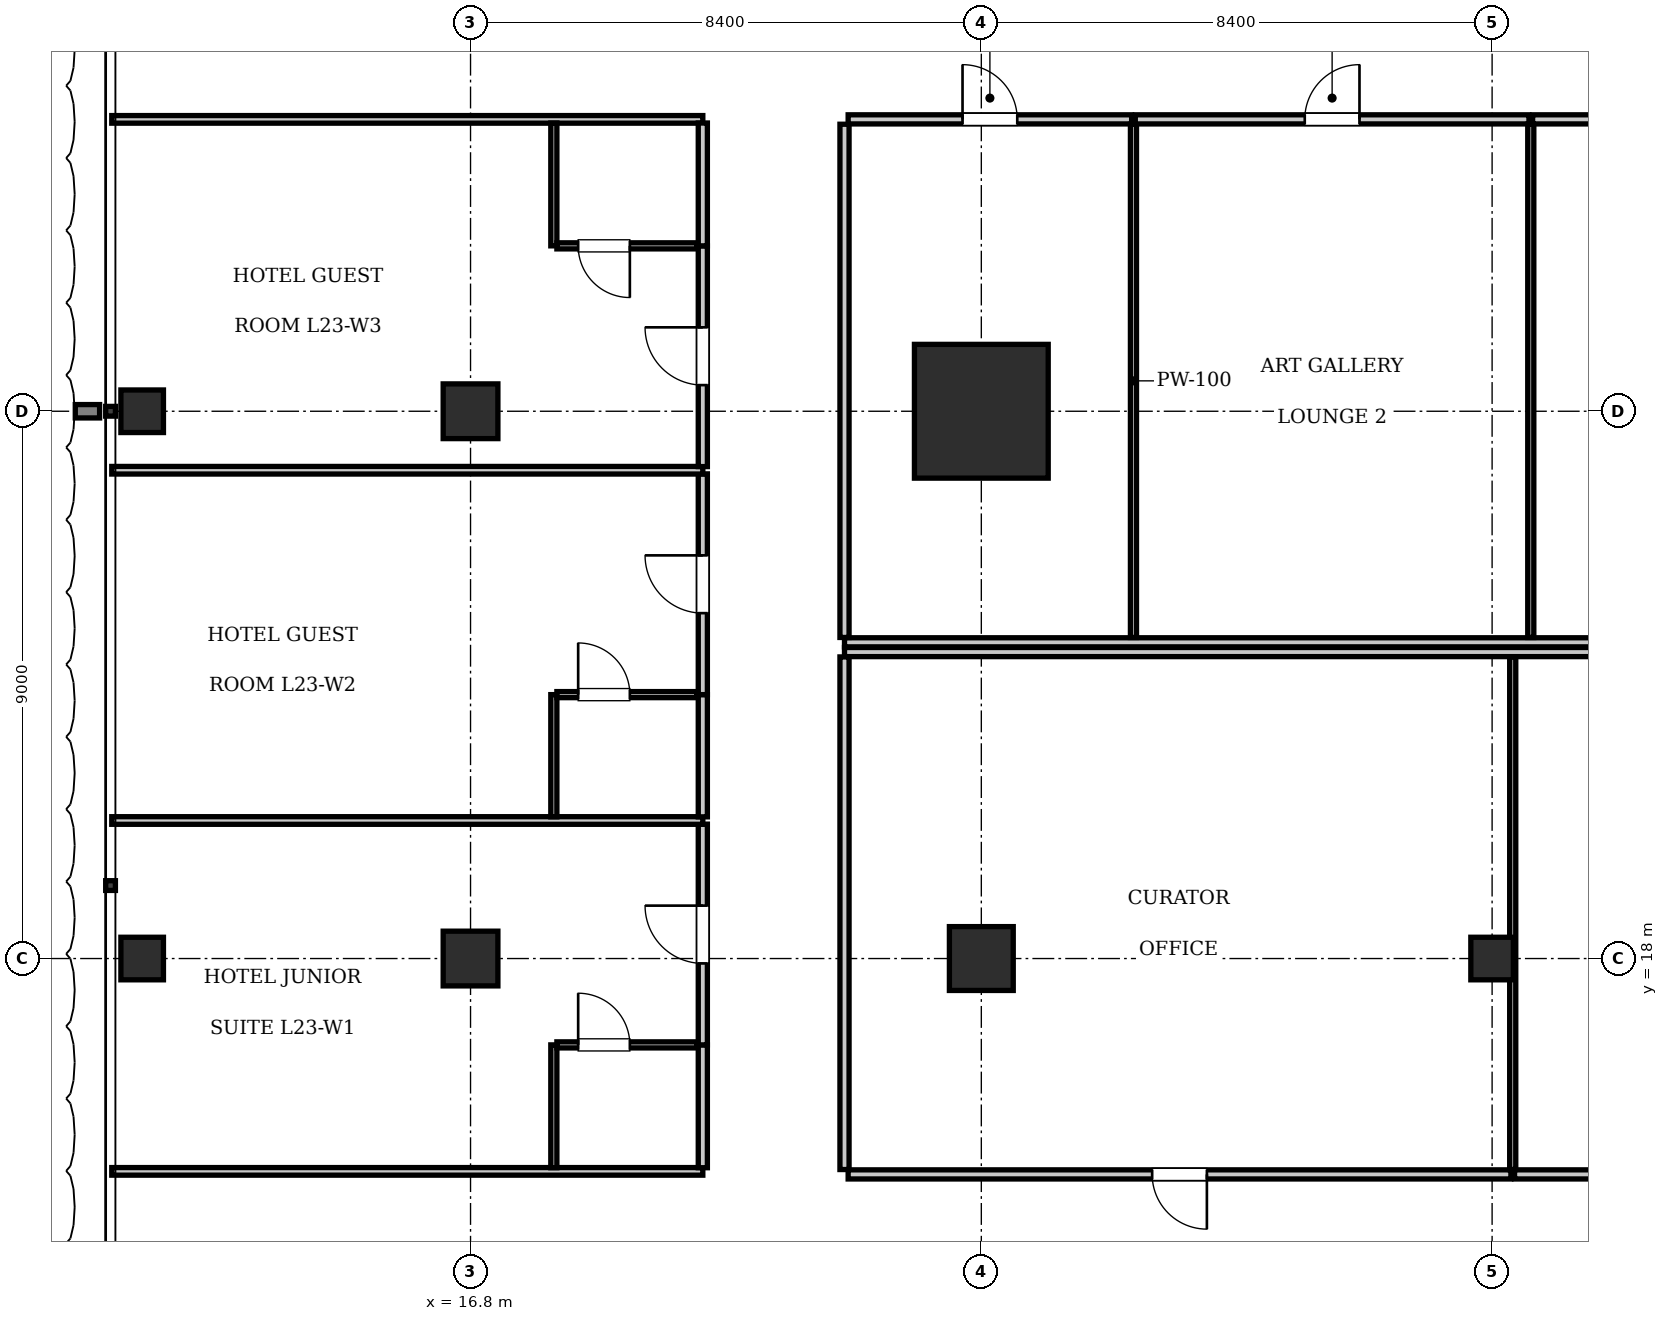
"""IFC4 building model, lengths in metres.
Left out: names, types, materials, properties, quantities, classifications, styles, units other than length and angle.
Written with IfcOpenShell. Run it as: python <this file> out.ifc"""

import sys

from ifc_helpers import new_model, si_unit, direction, frame, frame_2d, origin, origin_2d, place, context, subcontext, project, spatial, rectangle, i_section, extrude, element, fill, save


model = new_model("IFC4")
c1 = context("Model", 3, precision=1e-05, world=origin(), true_north=direction((0.0, 1.0)))
c2 = subcontext(c1, "Body", "Model", "MODEL_VIEW")
j1 = project(units=[si_unit("LENGTHUNIT", "METRE"), si_unit("PLANEANGLEUNIT", "RADIAN")], contexts=[c1])
p1 = place(None, origin())
s1 = spatial("IfcSite", under=j1, at=p1, CompositionType="ELEMENT")
p2 = place(p1, origin())
s2 = spatial("IfcBuilding", under=s1, at=p2, CompositionType="ELEMENT")
p3 = place(p2, frame((0.0, 0.0, 96.25)))
s3 = spatial("IfcBuildingStorey", under=s2, at=p3, CompositionType="ELEMENT", Elevation=96.25)
p4 = place(p3, frame((25.2, 27.0, 0.0), z_axis=(0.0, 0.0, 1.0), x_axis=(1.0, 0.0, 0.0)))
e1 = element("IfcColumn", 1, at=p4, inside=s3, PredefinedType="COLUMN", context=c2, shape_type="SweptSolid", body=[
    extrude(rectangle(XDim=2.2, YDim=2.2, at=origin_2d()), origin(), (0.0, 0.0, 1.0), 3.85),
])
p5 = place(p3, frame((25.2, 18.0, 0.0), z_axis=(0.0, 0.0, 1.0), x_axis=(1.0, 0.0, 0.0)))
e2 = element("IfcColumn", 2, at=p5, inside=s3, PredefinedType="COLUMN", context=c2, shape_type="SweptSolid", body=[
    extrude(rectangle(XDim=1.05, YDim=1.05, at=origin_2d()), origin(), (0.0, 0.0, 1.0), 3.85),
])
p6 = place(p3, frame((33.6, 18.0, 0.0), z_axis=(0.0, 0.0, 1.0), x_axis=(1.0, 0.0, 0.0)))
e3 = element("IfcColumn", 3, at=p6, inside=s3, PredefinedType="COLUMN", context=c2, shape_type="SweptSolid", body=[
    extrude(i_section(OverallWidth=0.7, OverallDepth=0.7, WebThickness=0.028, FlangeThickness=0.044, at=origin_2d()), origin(), (0.0, 0.0, 1.0), 3.85),
])
for number, where, z_axis, x_axis in (
    (4, (16.8, 18.0, 0.0), (0.0, 0.0, 1.0), (1.0, 0.0, 0.0)),
    (5, (16.8, 27.0, 0.0), (0.0, 0.0, 1.0), (1.0, 0.0, 0.0)),
):
    element("IfcColumn", number, at=place(p3, frame(where, z_axis=z_axis, x_axis=x_axis)), inside=s3, PredefinedType="COLUMN", context=c2, shape_type="SweptSolid", body=[
        extrude(rectangle(XDim=0.9, YDim=0.9, at=origin_2d()), origin(), (0.0, 0.0, 1.0), 3.85),
    ])
for number, where, z_axis, x_axis in (
    (6, (11.4, 18.0, 0.0), (0.0, 0.0, 1.0), (1.0, 0.0, 0.0)),
    (7, (11.4, 27.0, 0.0), (0.0, 0.0, 1.0), (1.0, 0.0, 0.0)),
):
    element("IfcColumn", number, at=place(p3, frame(where, z_axis=z_axis, x_axis=x_axis)), inside=s3, PredefinedType="COLUMN", context=c2, shape_type="SweptSolid", body=[
        extrude(i_section(OverallWidth=0.7, OverallDepth=0.7, WebThickness=0.028, FlangeThickness=0.044, at=origin_2d()), origin(), (0.0, 0.0, 1.0), 3.85),
    ])
p7 = place(p3, frame((22.95, 23.2, 0.0), z_axis=(0.0, 0.0, 1.0), x_axis=(1.0, 0.0, 0.0)))
e8 = element("IfcWall", 8, at=p7, inside=s3, PredefinedType="PARTITIONING", context=c2, shape_type="SweptSolid", body=[
    extrude(rectangle(XDim=29.7, YDim=0.15, at=frame_2d((14.85, 0.0))), origin(), (0.0, 0.0, 1.0), 3.61),
])
p8 = place(p3, frame((22.95, 23.28, 0.0), z_axis=(0.0, 0.0, 1.0), x_axis=(0.0, 1.0, 0.0)))
e9 = element("IfcWall", 9, at=p8, inside=s3, PredefinedType="PARTITIONING", context=c2, shape_type="SweptSolid", body=[
    extrude(rectangle(XDim=8.44, YDim=0.15, at=frame_2d((4.22, 0.0))), origin(), (0.0, 0.0, 1.0), 3.61),
])
p9 = place(p3, frame((23.01, 31.8, 0.0), z_axis=(0.0, 0.0, 1.0), x_axis=(1.0, 0.0, 0.0)))
e10 = element("IfcWall", 10, at=p9, inside=s3, PredefinedType="PARTITIONING", context=c2, shape_type="SweptSolid", body=[
    extrude(rectangle(XDim=4.662, YDim=0.15, at=frame_2d((2.331, 0.0))), origin(), (0.0, 0.0, 1.0), 3.61),
])
p10 = place(p9, frame((1.881, 0.0, 0.0)))
e11 = element("IfcOpeningElement", 11, at=p10, cuts=e10, PredefinedType="OPENING", context=c2, shape_type="SweptSolid", body=[
    extrude(rectangle(XDim=0.9, YDim=2.1, at=frame_2d((0.45, 1.05))), frame((0.0, 0.085, 0.0), z_axis=(0.0, -1.0, 0.0), x_axis=(1.0, 0.0, 0.0)), (0.0, 0.0, 1.0), 0.17),
])
p11 = place(p3, frame((27.702, 23.28, 0.0), z_axis=(0.0, 0.0, 1.0), x_axis=(0.0, 1.0, 0.0)))
e12 = element("IfcWall", 12, at=p11, inside=s3, PredefinedType="PARTITIONING", context=c2, shape_type="SweptSolid", body=[
    extrude(rectangle(XDim=8.44, YDim=0.1, at=frame_2d((4.22, 0.0))), origin(), (0.0, 0.0, 1.0), 3.61),
])
p12 = place(p3, frame((27.732, 31.8, 0.0), z_axis=(0.0, 0.0, 1.0), x_axis=(1.0, 0.0, 0.0)))
e13 = element("IfcWall", 13, at=p12, inside=s3, PredefinedType="PARTITIONING", context=c2, shape_type="SweptSolid", body=[
    extrude(rectangle(XDim=6.474, YDim=0.15, at=frame_2d((3.237, 0.0))), origin(), (0.0, 0.0, 1.0), 3.61),
])
p13 = place(p12, frame((2.787, 0.0, 0.0)))
e14 = element("IfcOpeningElement", 14, at=p13, cuts=e13, PredefinedType="OPENING", context=c2, shape_type="SweptSolid", body=[
    extrude(rectangle(XDim=0.9, YDim=2.1, at=frame_2d((0.45, 1.05))), frame((0.0, 0.085, 0.0), z_axis=(0.0, -1.0, 0.0), x_axis=(1.0, 0.0, 0.0)), (0.0, 0.0, 1.0), 0.17),
])
p14 = place(p3, frame((34.236, 23.28, 0.0), z_axis=(0.0, 0.0, 1.0), x_axis=(0.0, 1.0, 0.0)))
e15 = element("IfcWall", 15, at=p14, inside=s3, PredefinedType="PARTITIONING", context=c2, shape_type="SweptSolid", body=[
    extrude(rectangle(XDim=8.44, YDim=0.1, at=frame_2d((4.22, 0.0))), origin(), (0.0, 0.0, 1.0), 3.61),
])
p15 = place(p3, frame((34.266, 31.8, 0.0), z_axis=(0.0, 0.0, 1.0), x_axis=(1.0, 0.0, 0.0)))
e16 = element("IfcWall", 16, at=p15, inside=s3, PredefinedType="PARTITIONING", context=c2, shape_type="SweptSolid", body=[
    extrude(rectangle(XDim=8.256, YDim=0.15, at=frame_2d((4.128, 0.0))), origin(), (0.0, 0.0, 1.0), 3.61),
])
p16 = place(p15, frame((3.678, 0.0, 0.0)))
e17 = element("IfcOpeningElement", 17, at=p16, cuts=e16, PredefinedType="OPENING", context=c2, shape_type="SweptSolid", body=[
    extrude(rectangle(XDim=0.9, YDim=2.1, at=frame_2d((0.45, 1.05))), frame((0.0, 0.085, 0.0), z_axis=(0.0, -1.0, 0.0), x_axis=(1.0, 0.0, 0.0)), (0.0, 0.0, 1.0), 0.17),
])
p17 = place(p3, frame((22.95, 23.04, 0.0), z_axis=(0.0, 0.0, 1.0), x_axis=(1.0, 0.0, 0.0)))
e18 = element("IfcWall", 18, at=p17, inside=s3, PredefinedType="PARTITIONING", context=c2, shape_type="SweptSolid", body=[
    extrude(rectangle(XDim=29.7, YDim=0.15, at=frame_2d((14.85, 0.0))), origin(), (0.0, 0.0, 1.0), 3.61),
])
p18 = place(p3, frame((22.95, 14.53, 0.0), z_axis=(0.0, 0.0, 1.0), x_axis=(0.0, 1.0, 0.0)))
e19 = element("IfcWall", 19, at=p18, inside=s3, PredefinedType="PARTITIONING", context=c2, shape_type="SweptSolid", body=[
    extrude(rectangle(XDim=8.43, YDim=0.15, at=frame_2d((4.215, 0.0))), origin(), (0.0, 0.0, 1.0), 3.61),
])
p19 = place(p3, frame((23.01, 14.45, 0.0), z_axis=(0.0, 0.0, 1.0), x_axis=(1.0, 0.0, 0.0)))
e20 = element("IfcWall", 20, at=p19, inside=s3, PredefinedType="PARTITIONING", context=c2, shape_type="SweptSolid", body=[
    extrude(rectangle(XDim=10.899, YDim=0.15, at=frame_2d((5.449, 0.0))), origin(), (0.0, 0.0, 1.0), 3.61),
])
p20 = place(p19, frame((5.0, 0.0, 0.0)))
e21 = element("IfcOpeningElement", 21, at=p20, cuts=e20, PredefinedType="OPENING", context=c2, shape_type="SweptSolid", body=[
    extrude(rectangle(XDim=0.9, YDim=2.1, at=frame_2d((0.45, 1.05))), frame((0.0, 0.085, 0.0), z_axis=(0.0, -1.0, 0.0), x_axis=(1.0, 0.0, 0.0)), (0.0, 0.0, 1.0), 0.17),
])
p21 = place(p3, frame((33.939, 14.53, 0.0), z_axis=(0.0, 0.0, 1.0), x_axis=(0.0, 1.0, 0.0)))
e22 = element("IfcWall", 22, at=p21, inside=s3, PredefinedType="PARTITIONING", context=c2, shape_type="SweptSolid", body=[
    extrude(rectangle(XDim=8.43, YDim=0.1, at=frame_2d((4.215, 0.0))), origin(), (0.0, 0.0, 1.0), 3.61),
])
p22 = place(p3, frame((33.969, 14.45, 0.0), z_axis=(0.0, 0.0, 1.0), x_axis=(1.0, 0.0, 0.0)))
e23 = element("IfcWall", 23, at=p22, inside=s3, PredefinedType="PARTITIONING", context=c2, shape_type="SweptSolid", body=[
    extrude(rectangle(XDim=18.621, YDim=0.15, at=frame_2d((9.311, 0.0))), origin(), (0.0, 0.0, 1.0), 3.61),
])
p23 = place(p22, frame((8.861, 0.0, 0.0)))
e24 = element("IfcOpeningElement", 24, at=p23, cuts=e23, PredefinedType="OPENING", context=c2, shape_type="SweptSolid", body=[
    extrude(rectangle(XDim=0.9, YDim=2.1, at=frame_2d((0.45, 1.05))), frame((0.0, 0.085, 0.0), z_axis=(0.0, -1.0, 0.0), x_axis=(1.0, 0.0, 0.0)), (0.0, 0.0, 1.0), 0.17),
])
for number, where, z_axis, x_axis in (
    (25, (10.9, 14.5, 0.0), (0.0, 0.0, 1.0), (1.0, 0.0, 0.0)),
    (26, (10.9, 31.8, 0.0), (0.0, 0.0, 1.0), (1.0, 0.0, 0.0)),
):
    element("IfcWall", number, at=place(p3, frame(where, z_axis=z_axis, x_axis=x_axis)), inside=s3, PredefinedType="PARTITIONING", context=c2, shape_type="SweptSolid", body=[
        extrude(rectangle(XDim=9.72, YDim=0.125, at=frame_2d((4.86, 0.0))), origin(), (0.0, 0.0, 1.0), 3.61),
    ])
p24 = place(p3, frame((20.62, 14.56, 0.0), z_axis=(0.0, 0.0, 1.0), x_axis=(0.0, 1.0, 0.0)))
e27 = element("IfcWall", 27, at=p24, inside=s3, PredefinedType="PARTITIONING", context=c2, shape_type="SweptSolid", body=[
    extrude(rectangle(XDim=2.02, YDim=0.15, at=frame_2d((1.01, 0.0))), origin(), (0.0, 0.0, 1.0), 3.61),
])
p25 = place(p3, frame((20.62, 16.58, 0.0), z_axis=(0.0, 0.0, 1.0), x_axis=(0.0, 1.0, 0.0)))
e28 = element("IfcWall", 28, at=p25, inside=s3, PredefinedType="PARTITIONING", context=c2, shape_type="SweptSolid", body=[
    extrude(rectangle(XDim=3.63, YDim=0.15, at=frame_2d((1.815, 0.0))), origin(), (0.0, 0.0, 1.0), 3.61),
])
p26 = place(p25, frame((1.34, 0.0, 0.0)))
e29 = element("IfcOpeningElement", 29, at=p26, cuts=e28, PredefinedType="OPENING", context=c2, shape_type="SweptSolid", body=[
    extrude(rectangle(XDim=0.95, YDim=2.15, at=frame_2d((0.475, 1.075))), frame((0.0, 0.085, 0.0), z_axis=(0.0, -1.0, 0.0), x_axis=(1.0, 0.0, 0.0)), (0.0, 0.0, 1.0), 0.17),
])
p27 = place(p3, frame((18.17, 14.56, 0.0), z_axis=(0.0, 0.0, 1.0), x_axis=(0.0, 1.0, 0.0)))
e30 = element("IfcWall", 30, at=p27, inside=s3, PredefinedType="PARTITIONING", context=c2, shape_type="SweptSolid", body=[
    extrude(rectangle(XDim=2.02, YDim=0.1, at=frame_2d((1.01, 0.0))), origin(), (0.0, 0.0, 1.0), 3.61),
])
p28 = place(p3, frame((18.22, 16.58, 0.0), z_axis=(0.0, 0.0, 1.0), x_axis=(1.0, 0.0, 0.0)))
e31 = element("IfcWall", 31, at=p28, inside=s3, PredefinedType="PARTITIONING", context=c2, shape_type="SweptSolid", body=[
    extrude(rectangle(XDim=2.3, YDim=0.1, at=frame_2d((1.15, 0.0))), origin(), (0.0, 0.0, 1.0), 3.61),
])
p29 = place(p28, frame((0.35, 0.0, 0.0)))
e32 = element("IfcOpeningElement", 32, at=p29, cuts=e31, PredefinedType="OPENING", context=c2, shape_type="SweptSolid", body=[
    extrude(rectangle(XDim=0.85, YDim=2.1, at=frame_2d((0.425, 1.05))), frame((0.0, 0.06, 0.0), z_axis=(0.0, -1.0, 0.0), x_axis=(1.0, 0.0, 0.0)), (0.0, 0.0, 1.0), 0.12),
])
p30 = place(p3, frame((10.9, 20.27, 0.0), z_axis=(0.0, 0.0, 1.0), x_axis=(1.0, 0.0, 0.0)))
e33 = element("IfcWall", 33, at=p30, inside=s3, PredefinedType="PARTITIONING", context=c2, shape_type="SweptSolid", body=[
    extrude(rectangle(XDim=9.72, YDim=0.125, at=frame_2d((4.86, 0.0))), origin(), (0.0, 0.0, 1.0), 3.61),
])
p31 = place(p3, frame((20.62, 20.33, 0.0), z_axis=(0.0, 0.0, 1.0), x_axis=(0.0, 1.0, 0.0)))
e34 = element("IfcWall", 34, at=p31, inside=s3, PredefinedType="PARTITIONING", context=c2, shape_type="SweptSolid", body=[
    extrude(rectangle(XDim=2.01, YDim=0.15, at=frame_2d((1.005, 0.0))), origin(), (0.0, 0.0, 1.0), 3.61),
])
p32 = place(p3, frame((20.62, 22.34, 0.0), z_axis=(0.0, 0.0, 1.0), x_axis=(0.0, 1.0, 0.0)))
e35 = element("IfcWall", 35, at=p32, inside=s3, PredefinedType="PARTITIONING", context=c2, shape_type="SweptSolid", body=[
    extrude(rectangle(XDim=3.63, YDim=0.15, at=frame_2d((1.815, 0.0))), origin(), (0.0, 0.0, 1.0), 3.61),
])
p33 = place(p32, frame((1.34, 0.0, 0.0)))
e36 = element("IfcOpeningElement", 36, at=p33, cuts=e35, PredefinedType="OPENING", context=c2, shape_type="SweptSolid", body=[
    extrude(rectangle(XDim=0.95, YDim=2.15, at=frame_2d((0.475, 1.075))), frame((0.0, 0.085, 0.0), z_axis=(0.0, -1.0, 0.0), x_axis=(1.0, 0.0, 0.0)), (0.0, 0.0, 1.0), 0.17),
])
p34 = place(p3, frame((18.17, 20.33, 0.0), z_axis=(0.0, 0.0, 1.0), x_axis=(0.0, 1.0, 0.0)))
e37 = element("IfcWall", 37, at=p34, inside=s3, PredefinedType="PARTITIONING", context=c2, shape_type="SweptSolid", body=[
    extrude(rectangle(XDim=2.01, YDim=0.1, at=frame_2d((1.005, 0.0))), origin(), (0.0, 0.0, 1.0), 3.61),
])
p35 = place(p3, frame((18.22, 22.34, 0.0), z_axis=(0.0, 0.0, 1.0), x_axis=(1.0, 0.0, 0.0)))
e38 = element("IfcWall", 38, at=p35, inside=s3, PredefinedType="PARTITIONING", context=c2, shape_type="SweptSolid", body=[
    extrude(rectangle(XDim=2.3, YDim=0.1, at=frame_2d((1.15, 0.0))), origin(), (0.0, 0.0, 1.0), 3.61),
])
p36 = place(p35, frame((0.35, 0.0, 0.0)))
e39 = element("IfcOpeningElement", 39, at=p36, cuts=e38, PredefinedType="OPENING", context=c2, shape_type="SweptSolid", body=[
    extrude(rectangle(XDim=0.85, YDim=2.1, at=frame_2d((0.425, 1.05))), frame((0.0, 0.06, 0.0), z_axis=(0.0, -1.0, 0.0), x_axis=(1.0, 0.0, 0.0)), (0.0, 0.0, 1.0), 0.12),
])
p37 = place(p3, frame((10.9, 26.03, 0.0), z_axis=(0.0, 0.0, 1.0), x_axis=(1.0, 0.0, 0.0)))
e40 = element("IfcWall", 40, at=p37, inside=s3, PredefinedType="PARTITIONING", context=c2, shape_type="SweptSolid", body=[
    extrude(rectangle(XDim=9.72, YDim=0.125, at=frame_2d((4.86, 0.0))), origin(), (0.0, 0.0, 1.0), 3.61),
])
p38 = place(p3, frame((20.62, 26.09, 0.0), z_axis=(0.0, 0.0, 1.0), x_axis=(0.0, 1.0, 0.0)))
e41 = element("IfcWall", 41, at=p38, inside=s3, PredefinedType="PARTITIONING", context=c2, shape_type="SweptSolid", body=[
    extrude(rectangle(XDim=3.63, YDim=0.15, at=frame_2d((1.815, 0.0))), origin(), (0.0, 0.0, 1.0), 3.61),
])
p39 = place(p38, frame((1.34, 0.0, 0.0)))
e42 = element("IfcOpeningElement", 42, at=p39, cuts=e41, PredefinedType="OPENING", context=c2, shape_type="SweptSolid", body=[
    extrude(rectangle(XDim=0.95, YDim=2.15, at=frame_2d((0.475, 1.075))), frame((0.0, 0.085, 0.0), z_axis=(0.0, -1.0, 0.0), x_axis=(1.0, 0.0, 0.0)), (0.0, 0.0, 1.0), 0.17),
])
p40 = place(p3, frame((20.62, 29.72, 0.0), z_axis=(0.0, 0.0, 1.0), x_axis=(0.0, 1.0, 0.0)))
e43 = element("IfcWall", 43, at=p40, inside=s3, PredefinedType="PARTITIONING", context=c2, shape_type="SweptSolid", body=[
    extrude(rectangle(XDim=2.02, YDim=0.15, at=frame_2d((1.01, 0.0))), origin(), (0.0, 0.0, 1.0), 3.61),
])
p41 = place(p3, frame((18.17, 29.72, 0.0), z_axis=(0.0, 0.0, 1.0), x_axis=(0.0, 1.0, 0.0)))
e44 = element("IfcWall", 44, at=p41, inside=s3, PredefinedType="PARTITIONING", context=c2, shape_type="SweptSolid", body=[
    extrude(rectangle(XDim=2.02, YDim=0.1, at=frame_2d((1.01, 0.0))), origin(), (0.0, 0.0, 1.0), 3.61),
])
p42 = place(p3, frame((18.22, 29.72, 0.0), z_axis=(0.0, 0.0, 1.0), x_axis=(1.0, 0.0, 0.0)))
e45 = element("IfcWall", 45, at=p42, inside=s3, PredefinedType="PARTITIONING", context=c2, shape_type="SweptSolid", body=[
    extrude(rectangle(XDim=2.3, YDim=0.1, at=frame_2d((1.15, 0.0))), origin(), (0.0, 0.0, 1.0), 3.61),
])
p43 = place(p42, frame((0.35, 0.0, 0.0)))
e46 = element("IfcOpeningElement", 46, at=p43, cuts=e45, PredefinedType="OPENING", context=c2, shape_type="SweptSolid", body=[
    extrude(rectangle(XDim=0.85, YDim=2.1, at=frame_2d((0.425, 1.05))), frame((0.0, 0.06, 0.0), z_axis=(0.0, -1.0, 0.0), x_axis=(1.0, 0.0, 0.0)), (0.0, 0.0, 1.0), 0.12),
])
p44 = place(p10, origin())
e47 = element("IfcDoor", 47, at=p44, inside=s3, OperationType="SINGLE_SWING_LEFT", PredefinedType="DOOR", context=c2, shape_type="SweptSolid", body=[
    extrude(rectangle(XDim=0.9, YDim=2.1, at=frame_2d((0.45, 1.05))), frame((0.0, 0.025, 0.0), z_axis=(0.0, -1.0, 0.0), x_axis=(1.0, 0.0, 0.0)), (0.0, 0.0, 1.0), 0.05),
])
fill(e11, e47)
p45 = place(p13, origin())
e48 = element("IfcDoor", 48, at=p45, inside=s3, OperationType="SINGLE_SWING_RIGHT", PredefinedType="DOOR", context=c2, shape_type="SweptSolid", body=[
    extrude(rectangle(XDim=0.9, YDim=2.1, at=frame_2d((0.45, 1.05))), frame((0.0, 0.025, 0.0), z_axis=(0.0, -1.0, 0.0), x_axis=(1.0, 0.0, 0.0)), (0.0, 0.0, 1.0), 0.05),
])
fill(e14, e48)
p46 = place(p20, frame((0.9, 0.0, 0.0), z_axis=(0.0, 0.0, 1.0), x_axis=(-1.0, 0.0, 0.0)))
e49 = element("IfcDoor", 49, at=p46, inside=s3, OperationType="SINGLE_SWING_LEFT", PredefinedType="DOOR", context=c2, shape_type="SweptSolid", body=[
    extrude(rectangle(XDim=0.9, YDim=2.1, at=frame_2d((0.45, 1.05))), frame((0.0, 0.025, 0.0), z_axis=(0.0, -1.0, 0.0), x_axis=(1.0, 0.0, 0.0)), (0.0, 0.0, 1.0), 0.05),
])
fill(e21, e49)
p47 = place(p29, origin())
e50 = element("IfcDoor", 50, at=p47, inside=s3, OperationType="SINGLE_SWING_LEFT", PredefinedType="DOOR", context=c2, shape_type="SweptSolid", body=[
    extrude(rectangle(XDim=0.85, YDim=2.1, at=frame_2d((0.425, 1.05))), frame((0.0, 0.025, 0.0), z_axis=(0.0, -1.0, 0.0), x_axis=(1.0, 0.0, 0.0)), (0.0, 0.0, 1.0), 0.05),
])
fill(e32, e50)
p48 = place(p26, origin())
e51 = element("IfcDoor", 51, at=p48, inside=s3, OperationType="SINGLE_SWING_RIGHT", PredefinedType="DOOR", context=c2, shape_type="SweptSolid", body=[
    extrude(rectangle(XDim=0.95, YDim=2.15, at=frame_2d((0.475, 1.075))), frame((0.0, 0.025, 0.0), z_axis=(0.0, -1.0, 0.0), x_axis=(1.0, 0.0, 0.0)), (0.0, 0.0, 1.0), 0.05),
])
fill(e29, e51)
p49 = place(p36, origin())
e52 = element("IfcDoor", 52, at=p49, inside=s3, OperationType="SINGLE_SWING_LEFT", PredefinedType="DOOR", context=c2, shape_type="SweptSolid", body=[
    extrude(rectangle(XDim=0.85, YDim=2.1, at=frame_2d((0.425, 1.05))), frame((0.0, 0.025, 0.0), z_axis=(0.0, -1.0, 0.0), x_axis=(1.0, 0.0, 0.0)), (0.0, 0.0, 1.0), 0.05),
])
fill(e39, e52)
p50 = place(p33, origin())
e53 = element("IfcDoor", 53, at=p50, inside=s3, OperationType="SINGLE_SWING_RIGHT", PredefinedType="DOOR", context=c2, shape_type="SweptSolid", body=[
    extrude(rectangle(XDim=0.95, YDim=2.15, at=frame_2d((0.475, 1.075))), frame((0.0, 0.025, 0.0), z_axis=(0.0, -1.0, 0.0), x_axis=(1.0, 0.0, 0.0)), (0.0, 0.0, 1.0), 0.05),
])
fill(e36, e53)
p51 = place(p43, frame((0.85, 0.0, 0.0), z_axis=(0.0, 0.0, 1.0), x_axis=(-1.0, 0.0, 0.0)))
e54 = element("IfcDoor", 54, at=p51, inside=s3, OperationType="SINGLE_SWING_LEFT", PredefinedType="DOOR", context=c2, shape_type="SweptSolid", body=[
    extrude(rectangle(XDim=0.85, YDim=2.1, at=frame_2d((0.425, 1.05))), frame((0.0, 0.025, 0.0), z_axis=(0.0, -1.0, 0.0), x_axis=(1.0, 0.0, 0.0)), (0.0, 0.0, 1.0), 0.05),
])
fill(e46, e54)
p52 = place(p39, origin())
e55 = element("IfcDoor", 55, at=p52, inside=s3, OperationType="SINGLE_SWING_RIGHT", PredefinedType="DOOR", context=c2, shape_type="SweptSolid", body=[
    extrude(rectangle(XDim=0.95, YDim=2.15, at=frame_2d((0.475, 1.075))), frame((0.0, 0.025, 0.0), z_axis=(0.0, -1.0, 0.0), x_axis=(1.0, 0.0, 0.0)), (0.0, 0.0, 1.0), 0.05),
])
fill(e42, e55)
save(model, sys.argv[1])
